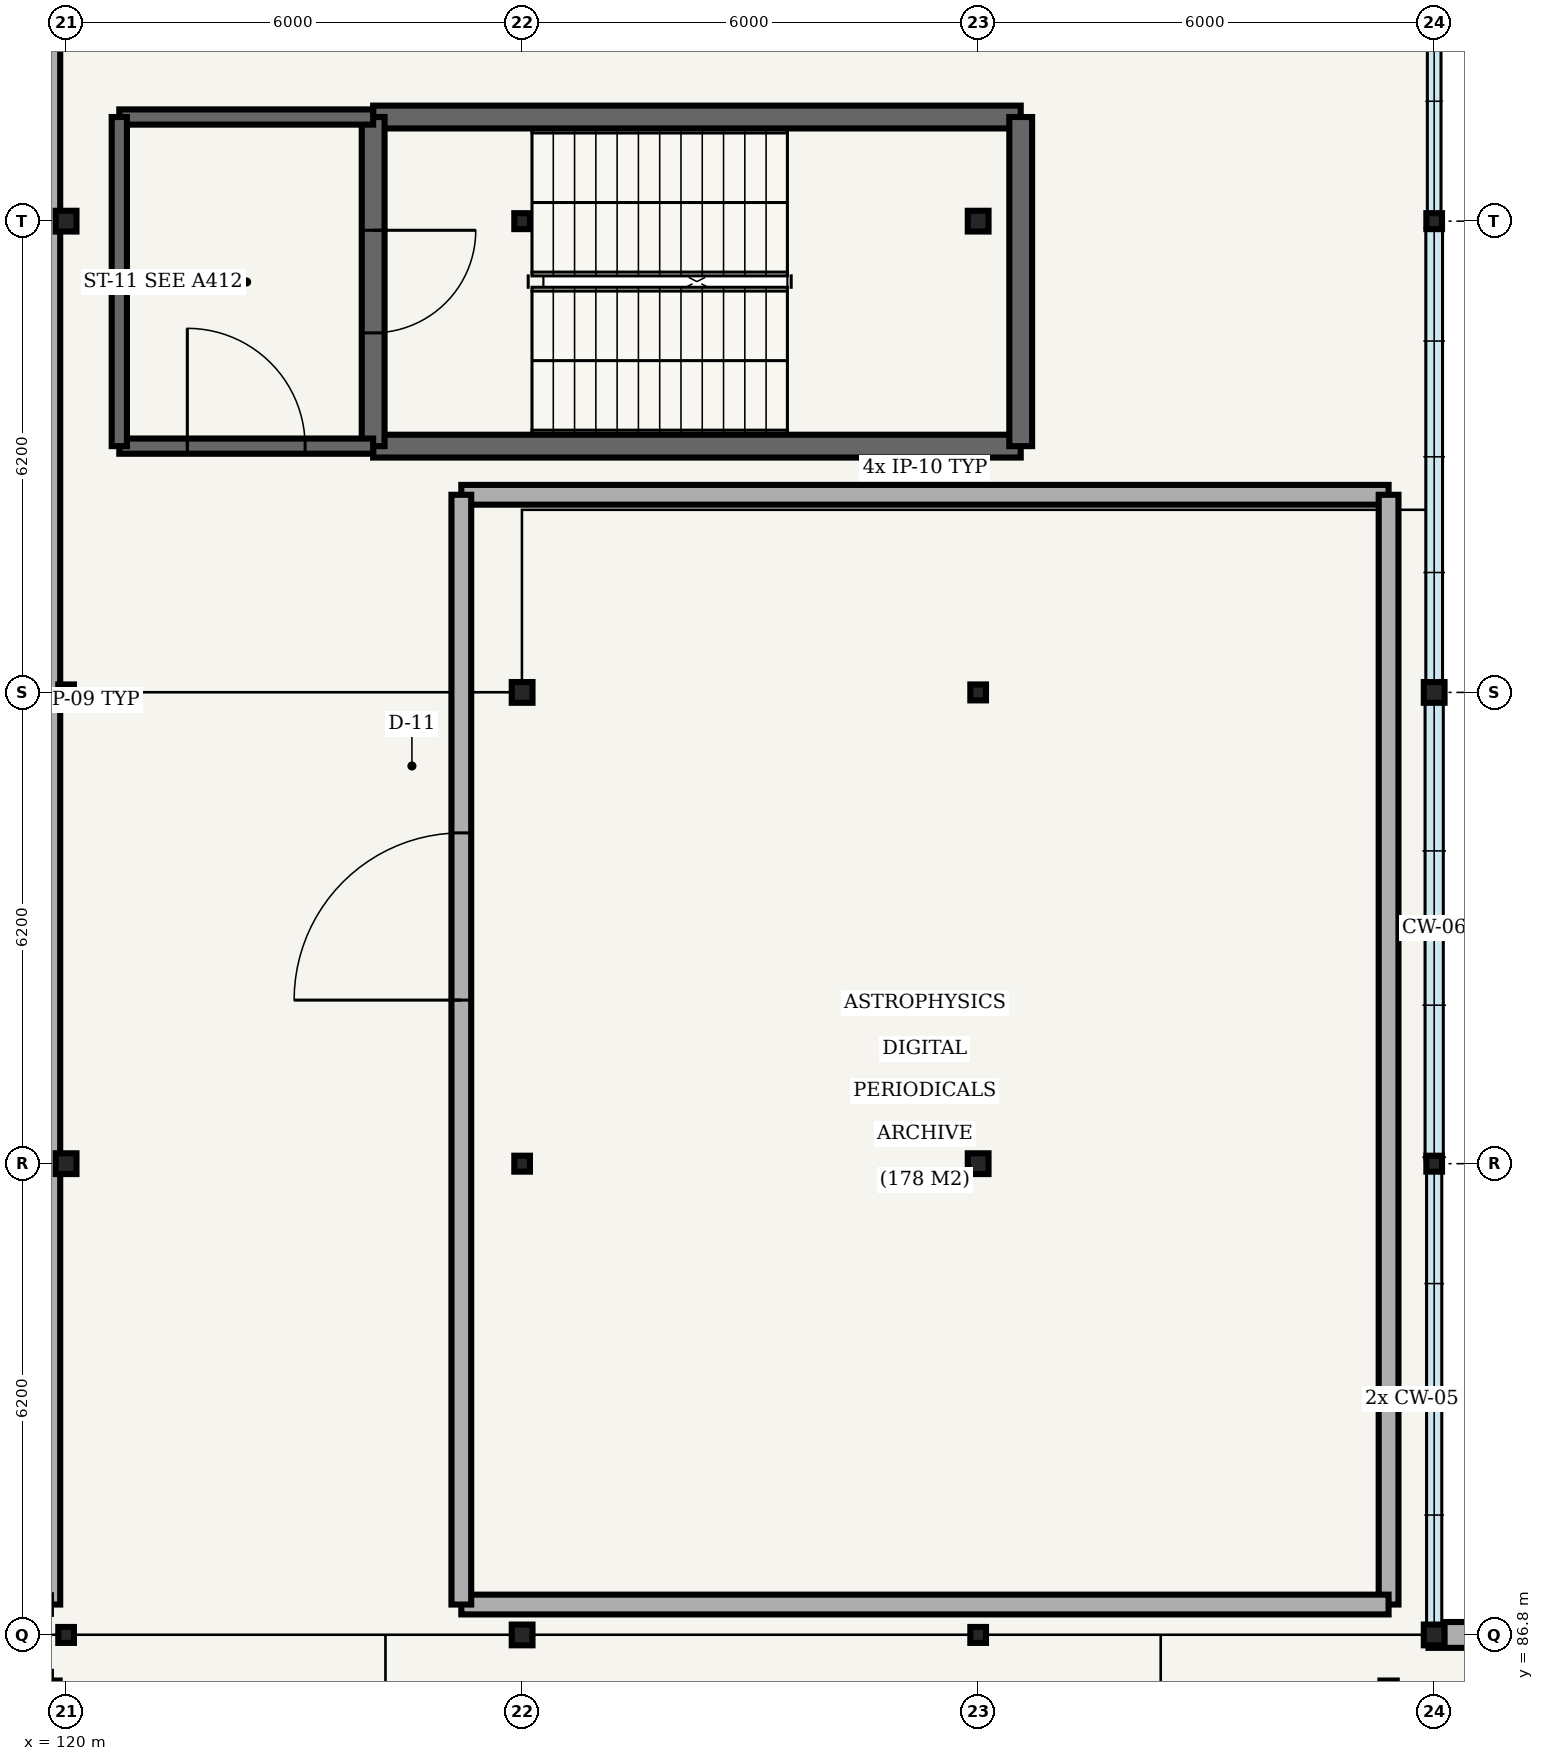
"""IFC4 building model, lengths in metres.
Left out: names, types, materials, properties, quantities, classifications, styles, units other than length and angle.
Written with IfcOpenShell. Run it as: python <this file> out.ifc"""

import sys

from ifc_helpers import new_model, si_unit, direction, frame, frame_2d, origin, origin_2d, place, context, subcontext, project, spatial, rectangle, hollow_circle, i_section, extrude, element, fill, save


model = new_model("IFC4")
c1 = context("Model", 3, precision=1e-05, world=origin(), true_north=direction((0.0, 1.0)))
c2 = subcontext(c1, "Body", "Model", "MODEL_VIEW")
j1 = project(units=[si_unit("LENGTHUNIT", "METRE"), si_unit("PLANEANGLEUNIT", "RADIAN")], contexts=[c1])
p1 = place(None, origin())
s1 = spatial("IfcSite", under=j1, at=p1, CompositionType="ELEMENT")
p2 = place(p1, origin())
s2 = spatial("IfcBuilding", under=s1, at=p2, CompositionType="ELEMENT")
p3 = place(p2, frame((0.0, 0.0, 20.4)))
s3 = spatial("IfcBuildingStorey", under=s2, at=p3, CompositionType="ELEMENT", Elevation=20.4)
p4 = place(p3, frame((120.0, 86.8, 0.0), z_axis=(0.0, 0.0, 1.0), x_axis=(1.0, 0.0, 0.0)))
e1 = element("IfcColumn", 1, at=p4, inside=s3, PredefinedType="COLUMN", context=c2, shape_type="SweptSolid", body=[
    extrude(i_section(OverallWidth=0.206, OverallDepth=0.21, WebThickness=0.01, FlangeThickness=0.014, FilletRadius=0.01, at=origin_2d()), origin(), (0.0, 0.0, 1.0), 4.8),
])
p5 = place(p3, frame((120.0, 93.0, 0.0), z_axis=(0.0, 0.0, 1.0), x_axis=(1.0, 0.0, 0.0)))
e2 = element("IfcColumn", 2, at=p5, inside=s3, PredefinedType="COLUMN", context=c2, shape_type="SweptSolid", body=[
    extrude(hollow_circle(Radius=0.136, WallThickness=0.01, at=origin_2d()), origin(), (0.0, 0.0, 1.0), 4.8),
])
p6 = place(p3, frame((120.0, 99.2, 0.0), z_axis=(0.0, 0.0, 1.0), x_axis=(1.0, 0.0, 0.0)))
e3 = element("IfcColumn", 3, at=p6, inside=s3, PredefinedType="COLUMN", context=c2, shape_type="SweptSolid", body=[
    extrude(i_section(OverallWidth=0.206, OverallDepth=0.21, WebThickness=0.01, FlangeThickness=0.014, FilletRadius=0.01, at=origin_2d()), origin(), (0.0, 0.0, 1.0), 4.8),
])
for number, where, z_axis, x_axis in (
    (4, (120.0, 105.4, 0.0), (0.0, 0.0, 1.0), (1.0, 0.0, 0.0)),
    (5, (126.0, 86.8, 0.0), (0.0, 0.0, 1.0), (1.0, 0.0, 0.0)),
):
    element("IfcColumn", number, at=place(p3, frame(where, z_axis=z_axis, x_axis=x_axis)), inside=s3, PredefinedType="COLUMN", context=c2, shape_type="SweptSolid", body=[
        extrude(hollow_circle(Radius=0.136, WallThickness=0.01, at=origin_2d()), origin(), (0.0, 0.0, 1.0), 4.8),
    ])
p7 = place(p3, frame((126.0, 93.0, 0.0), z_axis=(0.0, 0.0, 1.0), x_axis=(1.0, 0.0, 0.0)))
e6 = element("IfcColumn", 6, at=p7, inside=s3, PredefinedType="COLUMN", context=c2, shape_type="SweptSolid", body=[
    extrude(i_section(OverallWidth=0.206, OverallDepth=0.21, WebThickness=0.01, FlangeThickness=0.014, FilletRadius=0.01, at=origin_2d()), origin(), (0.0, 0.0, 1.0), 4.8),
])
p8 = place(p3, frame((126.0, 99.2, 0.0), z_axis=(0.0, 0.0, 1.0), x_axis=(1.0, 0.0, 0.0)))
e7 = element("IfcColumn", 7, at=p8, inside=s3, PredefinedType="COLUMN", context=c2, shape_type="SweptSolid", body=[
    extrude(hollow_circle(Radius=0.136, WallThickness=0.01, at=origin_2d()), origin(), (0.0, 0.0, 1.0), 4.8),
])
for number, where, z_axis, x_axis in (
    (8, (126.0, 105.4, 0.0), (0.0, 0.0, 1.0), (1.0, 0.0, 0.0)),
    (9, (132.0, 86.8, 0.0), (0.0, 0.0, 1.0), (1.0, 0.0, 0.0)),
):
    element("IfcColumn", number, at=place(p3, frame(where, z_axis=z_axis, x_axis=x_axis)), inside=s3, PredefinedType="COLUMN", context=c2, shape_type="SweptSolid", body=[
        extrude(i_section(OverallWidth=0.206, OverallDepth=0.21, WebThickness=0.01, FlangeThickness=0.014, FilletRadius=0.01, at=origin_2d()), origin(), (0.0, 0.0, 1.0), 4.8),
    ])
p9 = place(p3, frame((132.0, 93.0, 0.0), z_axis=(0.0, 0.0, 1.0), x_axis=(1.0, 0.0, 0.0)))
e10 = element("IfcColumn", 10, at=p9, inside=s3, PredefinedType="COLUMN", context=c2, shape_type="SweptSolid", body=[
    extrude(hollow_circle(Radius=0.136, WallThickness=0.01, at=origin_2d()), origin(), (0.0, 0.0, 1.0), 4.8),
])
p10 = place(p3, frame((132.0, 99.2, 0.0), z_axis=(0.0, 0.0, 1.0), x_axis=(1.0, 0.0, 0.0)))
e11 = element("IfcColumn", 11, at=p10, inside=s3, PredefinedType="COLUMN", context=c2, shape_type="SweptSolid", body=[
    extrude(i_section(OverallWidth=0.206, OverallDepth=0.21, WebThickness=0.01, FlangeThickness=0.014, FilletRadius=0.01, at=origin_2d()), origin(), (0.0, 0.0, 1.0), 4.8),
])
for number, where, z_axis, x_axis in (
    (12, (132.0, 105.4, 0.0), (0.0, 0.0, 1.0), (1.0, 0.0, 0.0)),
    (13, (138.0, 86.8, 0.0), (0.0, 0.0, 1.0), (1.0, 0.0, 0.0)),
):
    element("IfcColumn", number, at=place(p3, frame(where, z_axis=z_axis, x_axis=x_axis)), inside=s3, PredefinedType="COLUMN", context=c2, shape_type="SweptSolid", body=[
        extrude(hollow_circle(Radius=0.136, WallThickness=0.01, at=origin_2d()), origin(), (0.0, 0.0, 1.0), 4.8),
    ])
p11 = place(p3, frame((138.0, 93.0, 0.0), z_axis=(0.0, 0.0, 1.0), x_axis=(1.0, 0.0, 0.0)))
e14 = element("IfcColumn", 14, at=p11, inside=s3, PredefinedType="COLUMN", context=c2, shape_type="SweptSolid", body=[
    extrude(i_section(OverallWidth=0.206, OverallDepth=0.21, WebThickness=0.01, FlangeThickness=0.014, FilletRadius=0.01, at=origin_2d()), origin(), (0.0, 0.0, 1.0), 4.8),
])
p12 = place(p3, frame((138.0, 99.2, 0.0), z_axis=(0.0, 0.0, 1.0), x_axis=(1.0, 0.0, 0.0)))
e15 = element("IfcColumn", 15, at=p12, inside=s3, PredefinedType="COLUMN", context=c2, shape_type="SweptSolid", body=[
    extrude(hollow_circle(Radius=0.136, WallThickness=0.01, at=origin_2d()), origin(), (0.0, 0.0, 1.0), 4.8),
])
p13 = place(p3, frame((138.0, 105.4, 0.0), z_axis=(0.0, 0.0, 1.0), x_axis=(1.0, 0.0, 0.0)))
e16 = element("IfcColumn", 16, at=p13, inside=s3, PredefinedType="COLUMN", context=c2, shape_type="SweptSolid", body=[
    extrude(i_section(OverallWidth=0.206, OverallDepth=0.21, WebThickness=0.01, FlangeThickness=0.014, FilletRadius=0.01, at=origin_2d()), origin(), (0.0, 0.0, 1.0), 4.8),
])
p14 = place(p3, frame((145.275, 86.8, 0.0), z_axis=(0.0, 0.0, 1.0), x_axis=(-1.0, 0.0, 0.0)))
e17 = element("IfcWall", 17, at=p14, inside=s3, PredefinedType="SOLIDWALL", context=c2, shape_type="SweptSolid", body=[
    extrude(rectangle(XDim=7.35, YDim=0.34, at=frame_2d((3.675, 0.0))), origin(), (0.0, 0.0, 1.0), 3.76),
])
p15 = place(p14, frame((2.475, 0.0, 0.9)))
e18 = element("IfcOpeningElement", 18, at=p15, cuts=e17, PredefinedType="OPENING", context=c2, shape_type="SweptSolid", body=[
    extrude(rectangle(XDim=2.4, YDim=1.3, at=frame_2d((1.2, 0.65))), frame((0.0, 0.18, 0.0), z_axis=(0.0, -1.0, 0.0), x_axis=(1.0, 0.0, 0.0)), (0.0, 0.0, 1.0), 0.36),
])
for number, where, z_axis, x_axis in (
    (19, (124.04, 102.44, 0.0), (0.0, 0.0, 1.0), (1.0, 0.0, 0.0)),
    (20, (132.56, 106.77, 0.0), (0.0, 0.0, 1.0), (-1.0, 0.0, 0.0)),
):
    element("IfcWall", number, at=place(p3, frame(where, z_axis=z_axis, x_axis=x_axis)), inside=s3, PredefinedType="SHEAR", context=c2, shape_type="SweptSolid", body=[
        extrude(rectangle(XDim=8.52, YDim=0.3, at=frame_2d((4.26, 0.0))), origin(), (0.0, 0.0, 1.0), 4.55),
    ])
p16 = place(p3, frame((124.04, 106.77, 0.0), z_axis=(0.0, 0.0, 1.0), x_axis=(0.0, -1.0, 0.0)))
e21 = element("IfcWall", 21, at=p16, inside=s3, PredefinedType="SHEAR", context=c2, shape_type="SweptSolid", body=[
    extrude(rectangle(XDim=4.33, YDim=0.3, at=frame_2d((2.165, 0.0))), origin(), (0.0, 0.0, 1.0), 4.55),
])
p17 = place(p16, frame((1.49, 0.0, 0.0)))
e22 = element("IfcOpeningElement", 22, at=p17, cuts=e21, PredefinedType="OPENING", context=c2, shape_type="SweptSolid", body=[
    extrude(rectangle(XDim=1.35, YDim=2.2, at=frame_2d((0.675, 1.1))), frame((0.0, 0.16, 0.0), z_axis=(0.0, -1.0, 0.0), x_axis=(1.0, 0.0, 0.0)), (0.0, 0.0, 1.0), 0.32),
])
p18 = place(p3, frame((132.56, 102.44, 0.0), z_axis=(0.0, 0.0, 1.0), x_axis=(0.0, 1.0, 0.0)))
e23 = element("IfcWall", 23, at=p18, inside=s3, PredefinedType="SHEAR", context=c2, shape_type="SweptSolid", body=[
    extrude(rectangle(XDim=4.33, YDim=0.3, at=frame_2d((2.165, 0.0))), origin(), (0.0, 0.0, 1.0), 4.55),
])
p19 = place(p3, frame((120.7, 102.44, 0.0), z_axis=(0.0, 0.0, 1.0), x_axis=(1.0, 0.0, 0.0)))
e24 = element("IfcWall", 24, at=p19, inside=s3, PredefinedType="SHEAR", context=c2, shape_type="SweptSolid", body=[
    extrude(rectangle(XDim=3.34, YDim=0.2, at=frame_2d((1.67, 0.0))), origin(), (0.0, 0.0, 1.0), 4.55),
])
p20 = place(p19, frame((0.895, 0.0, 0.0)))
e25 = element("IfcOpeningElement", 25, at=p20, cuts=e24, PredefinedType="OPENING", context=c2, shape_type="SweptSolid", body=[
    extrude(rectangle(XDim=1.55, YDim=2.2, at=frame_2d((0.775, 1.1))), frame((0.0, 0.11, 0.0), z_axis=(0.0, -1.0, 0.0), x_axis=(1.0, 0.0, 0.0)), (0.0, 0.0, 1.0), 0.22),
])
p21 = place(p3, frame((124.04, 106.77, 0.0), z_axis=(0.0, 0.0, 1.0), x_axis=(-1.0, 0.0, 0.0)))
e26 = element("IfcWall", 26, at=p21, inside=s3, PredefinedType="SHEAR", context=c2, shape_type="SweptSolid", body=[
    extrude(rectangle(XDim=3.34, YDim=0.2, at=frame_2d((1.67, 0.0))), origin(), (0.0, 0.0, 1.0), 4.55),
])
p22 = place(p3, frame((120.7, 106.77, 0.0), z_axis=(0.0, 0.0, 1.0), x_axis=(0.0, -1.0, 0.0)))
e27 = element("IfcWall", 27, at=p22, inside=s3, PredefinedType="SHEAR", context=c2, shape_type="SweptSolid", body=[
    extrude(rectangle(XDim=4.33, YDim=0.2, at=frame_2d((2.165, 0.0))), origin(), (0.0, 0.0, 1.0), 4.55),
])
p23 = place(p3, frame((119.8, 111.0, 0.0), z_axis=(0.0, 0.0, 1.0), x_axis=(0.0, -1.0, 0.0)))
e28 = element("IfcWall", 28, at=p23, inside=s3, PredefinedType="PARTITIONING", context=c2, shape_type="SweptSolid", body=[
    extrude(rectangle(XDim=23.8, YDim=0.245, at=frame_2d((11.9, 0.0))), origin(), (0.0, 0.0, 1.0), 3.65),
])
p24 = place(p3, frame((125.2, 101.8, 0.0), z_axis=(0.0, 0.0, 1.0), x_axis=(1.0, 0.0, 0.0)))
e29 = element("IfcWall", 29, at=p24, inside=s3, PredefinedType="PARTITIONING", context=c2, shape_type="SweptSolid", body=[
    extrude(rectangle(XDim=12.2, YDim=0.26, at=frame_2d((6.1, 0.0))), origin(), (0.0, 0.0, 1.0), 3.65),
])
p25 = place(p3, frame((137.4, 101.8, 0.0), z_axis=(0.0, 0.0, 1.0), x_axis=(0.0, -1.0, 0.0)))
e30 = element("IfcWall", 30, at=p25, inside=s3, PredefinedType="PARTITIONING", context=c2, shape_type="SweptSolid", body=[
    extrude(rectangle(XDim=14.6, YDim=0.26, at=frame_2d((7.3, 0.0))), origin(), (0.0, 0.0, 1.0), 3.65),
])
p26 = place(p3, frame((137.4, 87.2, 0.0), z_axis=(0.0, 0.0, 1.0), x_axis=(-1.0, 0.0, 0.0)))
e31 = element("IfcWall", 31, at=p26, inside=s3, PredefinedType="PARTITIONING", context=c2, shape_type="SweptSolid", body=[
    extrude(rectangle(XDim=12.2, YDim=0.26, at=frame_2d((6.1, 0.0))), origin(), (0.0, 0.0, 1.0), 3.65),
])
p27 = place(p3, frame((125.2, 87.2, 0.0), z_axis=(0.0, 0.0, 1.0), x_axis=(0.0, 1.0, 0.0)))
e32 = element("IfcWall", 32, at=p27, inside=s3, PredefinedType="PARTITIONING", context=c2, shape_type="SweptSolid", body=[
    extrude(rectangle(XDim=14.6, YDim=0.26, at=frame_2d((7.3, 0.0))), origin(), (0.0, 0.0, 1.0), 3.65),
])
p28 = place(p27, frame((7.952, 0.0, 0.0)))
e33 = element("IfcOpeningElement", 33, at=p28, cuts=e32, PredefinedType="OPENING", context=c2, shape_type="SweptSolid", body=[
    extrude(rectangle(XDim=2.2, YDim=2.1, at=frame_2d((1.1, 1.05))), frame((0.0, 0.14, 0.0), z_axis=(0.0, -1.0, 0.0), x_axis=(1.0, 0.0, 0.0)), (0.0, 0.0, 1.0), 0.28),
])
p29 = place(p17, origin())
e34 = element("IfcDoor", 34, at=p29, inside=s3, OperationType="SINGLE_SWING_LEFT", PredefinedType="DOOR", context=c2, shape_type="SweptSolid", body=[
    extrude(rectangle(XDim=1.35, YDim=2.2, at=frame_2d((0.675, 1.1))), frame((0.0, 0.025, 0.0), z_axis=(0.0, -1.0, 0.0), x_axis=(1.0, 0.0, 0.0)), (0.0, 0.0, 1.0), 0.05),
])
fill(e22, e34)
p30 = place(p20, origin())
e35 = element("IfcDoor", 35, at=p30, inside=s3, OperationType="SINGLE_SWING_LEFT", PredefinedType="DOOR", context=c2, shape_type="SweptSolid", body=[
    extrude(rectangle(XDim=1.55, YDim=2.2, at=frame_2d((0.775, 1.1))), frame((0.0, 0.025, 0.0), z_axis=(0.0, -1.0, 0.0), x_axis=(1.0, 0.0, 0.0)), (0.0, 0.0, 1.0), 0.05),
])
fill(e25, e35)
p31 = place(p28, origin())
e36 = element("IfcDoor", 36, at=p31, inside=s3, OperationType="DOUBLE_DOOR_SINGLE_SWING", PredefinedType="DOOR", context=c2, shape_type="SweptSolid", body=[
    extrude(rectangle(XDim=2.2, YDim=2.1, at=frame_2d((1.1, 1.05))), frame((0.0, 0.025, 0.0), z_axis=(0.0, -1.0, 0.0), x_axis=(1.0, 0.0, 0.0)), (0.0, 0.0, 1.0), 0.05),
])
fill(e33, e36)
save(model, sys.argv[1])
